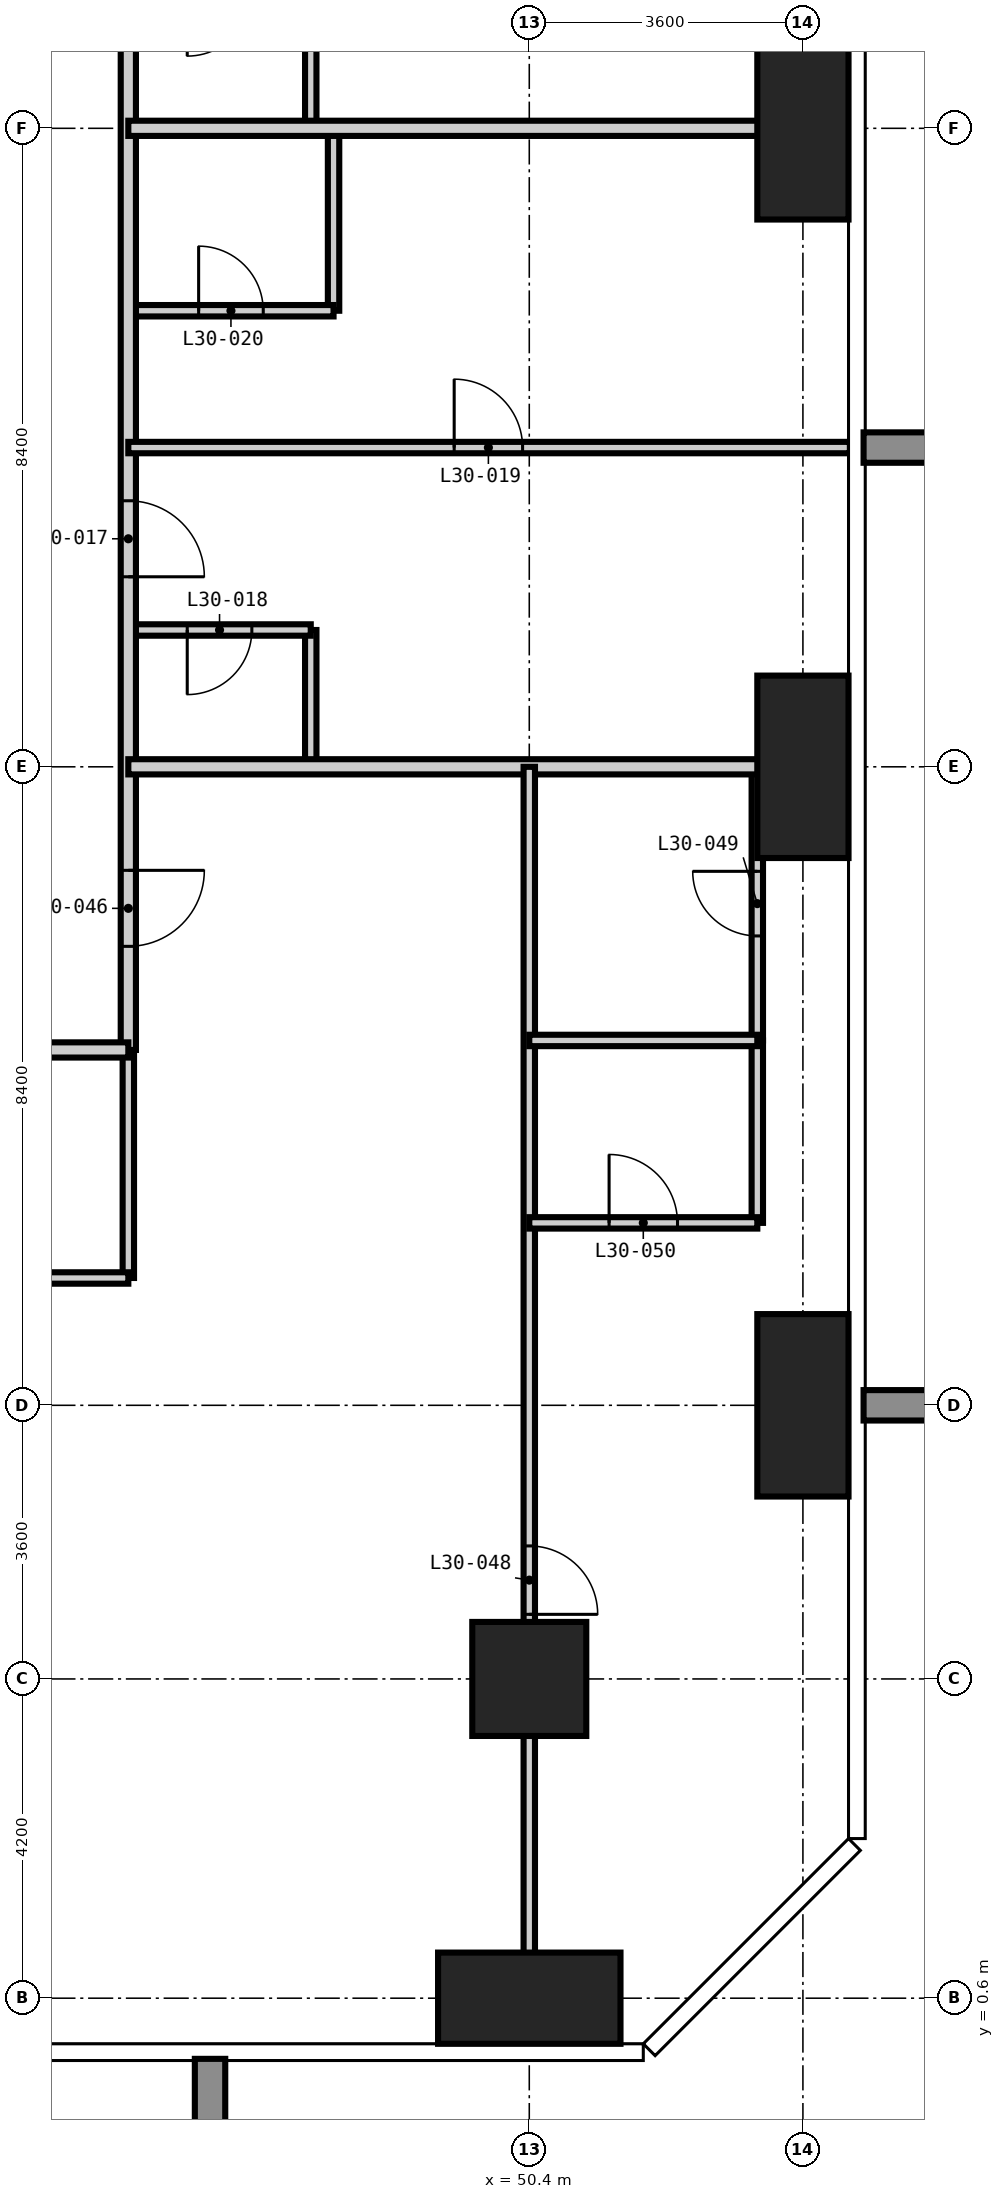
"""IFC4 building model, lengths in metres.
Left out: names, types, materials, properties, quantities, classifications, styles, units other than length and angle.
Written with IfcOpenShell. Run it as: python <this file> out.ifc"""

import sys

from ifc_helpers import new_model, si_unit, direction, frame, frame_2d, origin, origin_2d, place, context, subcontext, project, spatial, rectangle, extrude, element, fill, save


model = new_model("IFC4")
c1 = context("Model", 3, precision=1e-05, world=origin(), true_north=direction((0.0, 1.0)))
c2 = subcontext(c1, "Body", "Model", "MODEL_VIEW")
j1 = project(units=[si_unit("LENGTHUNIT", "METRE"), si_unit("PLANEANGLEUNIT", "RADIAN")], contexts=[c1])
p1 = place(None, origin())
s1 = spatial("IfcSite", under=j1, at=p1, CompositionType="ELEMENT")
p2 = place(p1, origin())
s2 = spatial("IfcBuilding", under=s1, at=p2, CompositionType="ELEMENT")
p3 = place(p2, frame((0.0, 0.0, 118.8)))
s3 = spatial("IfcBuildingStorey", under=s2, at=p3, CompositionType="ELEMENT", Elevation=118.8)
p4 = place(p3, frame((50.4, 0.6, -0.35), z_axis=(0.0, 0.0, 1.0), x_axis=(1.0, 0.0, 0.0)))
e1 = element("IfcColumn", 1, at=p4, inside=s3, PredefinedType="COLUMN", context=c2, shape_type="SweptSolid", body=[
    extrude(rectangle(XDim=2.4, YDim=1.2, at=origin_2d()), origin(), (0.0, 0.0, 1.0), 3.6),
])
p5 = place(p3, frame((50.4, 4.8, -0.35), z_axis=(0.0, 0.0, 1.0), x_axis=(1.0, 0.0, 0.0)))
e2 = element("IfcColumn", 2, at=p5, inside=s3, PredefinedType="COLUMN", context=c2, shape_type="SweptSolid", body=[
    extrude(rectangle(XDim=1.5, YDim=1.5, at=origin_2d()), origin(), (0.0, 0.0, 1.0), 3.6),
])
for number, where, z_axis, x_axis in (
    (3, (54.0, 8.4, -0.35), (0.0, 0.0, 1.0), (1.0, 0.0, 0.0)),
    (4, (54.0, 16.8, -0.35), (0.0, 0.0, 1.0), (1.0, 0.0, 0.0)),
    (5, (54.0, 25.2, -0.35), (0.0, 0.0, 1.0), (1.0, 0.0, 0.0)),
):
    element("IfcColumn", number, at=place(p3, frame(where, z_axis=z_axis, x_axis=x_axis)), inside=s3, PredefinedType="COLUMN", context=c2, shape_type="SweptSolid", body=[
        extrude(rectangle(XDim=1.2, YDim=2.4, at=origin_2d()), origin(), (0.0, 0.0, 1.0), 3.6),
    ])
p6 = place(p3, frame((45.125, 10.075, 0.0), z_axis=(0.0, 0.0, 1.0), x_axis=(0.0, 1.0, 0.0)))
e6 = element("IfcWall", 6, at=p6, inside=s3, PredefinedType="PARTITIONING", context=c2, shape_type="SweptSolid", body=[
    extrude(rectangle(XDim=3.0, YDim=0.15, at=frame_2d((1.5, 0.0))), origin(), (0.0, 0.0, 1.0), 3.25),
])
for number, where, z_axis, x_axis in (
    (7, (47.525, 16.8, 0.0), (0.0, 0.0, 1.0), (0.0, 1.0, 0.0)),
    (8, (47.525, 25.2, 0.0), (0.0, 0.0, 1.0), (0.0, 1.0, 0.0)),
):
    element("IfcWall", number, at=place(p3, frame(where, z_axis=z_axis, x_axis=x_axis)), inside=s3, PredefinedType="PARTITIONING", context=c2, shape_type="SweptSolid", body=[
        extrude(rectangle(XDim=1.8, YDim=0.15, at=frame_2d((0.9, 0.0))), origin(), (0.0, 0.0, 1.0), 3.25),
    ])
p7 = place(p3, frame((47.825, 22.8, 0.0), z_axis=(0.0, 0.0, 1.0), x_axis=(0.0, 1.0, 0.0)))
e9 = element("IfcWall", 9, at=p7, inside=s3, PredefinedType="PARTITIONING", context=c2, shape_type="SweptSolid", body=[
    extrude(rectangle(XDim=2.4, YDim=0.15, at=frame_2d((1.2, 0.0))), origin(), (0.0, 0.0, 1.0), 3.25),
])
p8 = place(p3, frame((53.4, 13.2, 0.0), z_axis=(0.0, 0.0, 1.0), x_axis=(0.0, 1.0, 0.0)))
e10 = element("IfcWall", 10, at=p8, inside=s3, PredefinedType="PARTITIONING", context=c2, shape_type="SweptSolid", body=[
    extrude(rectangle(XDim=3.6, YDim=0.15, at=frame_2d((1.8, 0.0))), origin(), (0.0, 0.0, 1.0), 3.25),
])
p9 = place(p8, frame((1.375, 0.0, 0.0)))
e11 = element("IfcOpeningElement", 11, at=p9, cuts=e10, PredefinedType="OPENING", context=c2, shape_type="SweptSolid", body=[
    extrude(rectangle(XDim=0.85, YDim=2.1, at=frame_2d((0.425, 1.05))), frame((0.0, 0.085, 0.0), z_axis=(0.0, -1.0, 0.0), x_axis=(1.0, 0.0, 0.0)), (0.0, 0.0, 1.0), 0.17),
])
p10 = place(p3, frame((42.0, 10.075, 0.0), z_axis=(0.0, 0.0, 1.0), x_axis=(1.0, 0.0, 0.0)))
e12 = element("IfcWall", 12, at=p10, inside=s3, PredefinedType="PARTITIONING", context=c2, shape_type="SweptSolid", body=[
    extrude(rectangle(XDim=3.125, YDim=0.15, at=frame_2d((1.562, 0.0))), origin(), (0.0, 0.0, 1.0), 3.25),
])
p11 = place(p10, frame((1.138, 0.0, 0.0)))
e13 = element("IfcOpeningElement", 13, at=p11, cuts=e12, PredefinedType="OPENING", context=c2, shape_type="SweptSolid", body=[
    extrude(rectangle(XDim=0.85, YDim=2.1, at=frame_2d((0.425, 1.05))), frame((0.0, 0.085, 0.0), z_axis=(0.0, -1.0, 0.0), x_axis=(1.0, 0.0, 0.0)), (0.0, 0.0, 1.0), 0.17),
])
p12 = place(p3, frame((45.125, 18.6, 0.0), z_axis=(0.0, 0.0, 1.0), x_axis=(1.0, 0.0, 0.0)))
e14 = element("IfcWall", 14, at=p12, inside=s3, PredefinedType="PARTITIONING", context=c2, shape_type="SweptSolid", body=[
    extrude(rectangle(XDim=2.4, YDim=0.15, at=frame_2d((1.2, 0.0))), origin(), (0.0, 0.0, 1.0), 3.25),
])
p13 = place(p12, frame((0.775, 0.0, 0.0)))
e15 = element("IfcOpeningElement", 15, at=p13, cuts=e14, PredefinedType="OPENING", context=c2, shape_type="SweptSolid", body=[
    extrude(rectangle(XDim=0.85, YDim=2.1, at=frame_2d((0.425, 1.05))), frame((0.0, 0.085, 0.0), z_axis=(0.0, -1.0, 0.0), x_axis=(1.0, 0.0, 0.0)), (0.0, 0.0, 1.0), 0.17),
])
p14 = place(p3, frame((45.125, 22.8, 0.0), z_axis=(0.0, 0.0, 1.0), x_axis=(1.0, 0.0, 0.0)))
e16 = element("IfcWall", 16, at=p14, inside=s3, PredefinedType="PARTITIONING", context=c2, shape_type="SweptSolid", body=[
    extrude(rectangle(XDim=2.7, YDim=0.15, at=frame_2d((1.35, 0.0))), origin(), (0.0, 0.0, 1.0), 3.25),
])
p15 = place(p14, frame((0.925, 0.0, 0.0)))
e17 = element("IfcOpeningElement", 17, at=p15, cuts=e16, PredefinedType="OPENING", context=c2, shape_type="SweptSolid", body=[
    extrude(rectangle(XDim=0.85, YDim=2.1, at=frame_2d((0.425, 1.05))), frame((0.0, 0.085, 0.0), z_axis=(0.0, -1.0, 0.0), x_axis=(1.0, 0.0, 0.0)), (0.0, 0.0, 1.0), 0.17),
])
p16 = place(p3, frame((45.125, 44.525, 0.0), z_axis=(0.0, 0.0, 1.0), x_axis=(0.0, -1.0, 0.0)))
e18 = element("IfcWall", 18, at=p16, inside=s3, PredefinedType="PARTITIONING", context=c2, shape_type="SweptSolid", body=[
    extrude(rectangle(XDim=31.45, YDim=0.2, at=frame_2d((15.725, 0.0))), origin(), (0.0, 0.0, 1.0), 3.25),
])
p17 = place(p16, frame((24.225, 0.0, 0.0)))
e19 = element("IfcOpeningElement", 19, at=p17, cuts=e18, PredefinedType="OPENING", context=c2, shape_type="SweptSolid", body=[
    extrude(rectangle(XDim=1.0, YDim=2.2, at=frame_2d((0.5, 1.1))), frame((0.0, 0.11, 0.0), z_axis=(0.0, -1.0, 0.0), x_axis=(1.0, 0.0, 0.0)), (0.0, 0.0, 1.0), 0.22),
])
p18 = place(p16, frame((15.825, 0.0, 0.0)))
e20 = element("IfcOpeningElement", 20, at=p18, cuts=e18, PredefinedType="OPENING", context=c2, shape_type="SweptSolid", body=[
    extrude(rectangle(XDim=1.0, YDim=2.2, at=frame_2d((0.5, 1.1))), frame((0.0, 0.11, 0.0), z_axis=(0.0, -1.0, 0.0), x_axis=(1.0, 0.0, 0.0)), (0.0, 0.0, 1.0), 0.22),
])
p19 = place(p16, frame((7.425, 0.0, 0.0)))
e21 = element("IfcOpeningElement", 21, at=p19, cuts=e18, PredefinedType="OPENING", context=c2, shape_type="SweptSolid", body=[
    extrude(rectangle(XDim=1.0, YDim=2.2, at=frame_2d((0.5, 1.1))), frame((0.0, 0.11, 0.0), z_axis=(0.0, -1.0, 0.0), x_axis=(1.0, 0.0, 0.0)), (0.0, 0.0, 1.0), 0.22),
])
p20 = place(p16, frame((29.087, 0.0, 0.0)))
e22 = element("IfcOpeningElement", 22, at=p20, cuts=e18, PredefinedType="OPENING", context=c2, shape_type="SweptSolid", body=[
    extrude(rectangle(XDim=1.0, YDim=2.2, at=frame_2d((0.5, 1.1))), frame((0.0, 0.11, 0.0), z_axis=(0.0, -1.0, 0.0), x_axis=(1.0, 0.0, 0.0)), (0.0, 0.0, 1.0), 0.22),
])
p21 = place(p16, frame((0.762, 0.0, 0.0)))
e23 = element("IfcOpeningElement", 23, at=p21, cuts=e18, PredefinedType="OPENING", context=c2, shape_type="SweptSolid", body=[
    extrude(rectangle(XDim=1.0, YDim=2.2, at=frame_2d((0.5, 1.1))), frame((0.0, 0.11, 0.0), z_axis=(0.0, -1.0, 0.0), x_axis=(1.0, 0.0, 0.0)), (0.0, 0.0, 1.0), 0.22),
])
p22 = place(p3, frame((45.125, 13.075, 0.0), z_axis=(0.0, 0.0, 1.0), x_axis=(-1.0, 0.0, 0.0)))
e24 = element("IfcWall", 24, at=p22, inside=s3, PredefinedType="PARTITIONING", context=c2, shape_type="SweptSolid", body=[
    extrude(rectangle(XDim=32.525, YDim=0.2, at=frame_2d((16.262, 0.0))), origin(), (0.0, 0.0, 1.0), 3.25),
])
p23 = place(p22, frame((22.425, 0.0, 0.0)))
e25 = element("IfcOpeningElement", 25, at=p23, cuts=e24, PredefinedType="OPENING", context=c2, shape_type="SweptSolid", body=[
    extrude(rectangle(XDim=1.0, YDim=2.2, at=frame_2d((0.5, 1.1))), frame((0.0, 0.11, 0.0), z_axis=(0.0, -1.0, 0.0), x_axis=(1.0, 0.0, 0.0)), (0.0, 0.0, 1.0), 0.22),
])
p24 = place(p22, frame((14.025, 0.0, 0.0)))
e26 = element("IfcOpeningElement", 26, at=p24, cuts=e24, PredefinedType="OPENING", context=c2, shape_type="SweptSolid", body=[
    extrude(rectangle(XDim=1.0, YDim=2.2, at=frame_2d((0.5, 1.1))), frame((0.0, 0.11, 0.0), z_axis=(0.0, -1.0, 0.0), x_axis=(1.0, 0.0, 0.0)), (0.0, 0.0, 1.0), 0.22),
])
p25 = place(p22, frame((5.625, 0.0, 0.0)))
e27 = element("IfcOpeningElement", 27, at=p25, cuts=e24, PredefinedType="OPENING", context=c2, shape_type="SweptSolid", body=[
    extrude(rectangle(XDim=1.0, YDim=2.2, at=frame_2d((0.5, 1.1))), frame((0.0, 0.11, 0.0), z_axis=(0.0, -1.0, 0.0), x_axis=(1.0, 0.0, 0.0)), (0.0, 0.0, 1.0), 0.22),
])
for number, where, z_axis, x_axis in (
    (28, (45.125, 16.8, 0.0), (0.0, 0.0, 1.0), (1.0, 0.0, 0.0)),
    (29, (45.125, 25.2, 0.0), (0.0, 0.0, 1.0), (1.0, 0.0, 0.0)),
):
    element("IfcWall", number, at=place(p3, frame(where, z_axis=z_axis, x_axis=x_axis)), inside=s3, PredefinedType="PARTITIONING", context=c2, shape_type="SweptSolid", body=[
        extrude(rectangle(XDim=9.493, YDim=0.2, at=frame_2d((4.747, 0.0))), origin(), (0.0, 0.0, 1.0), 3.25),
    ])
p26 = place(p3, frame((50.4, -0.018, 0.0), z_axis=(0.0, 0.0, 1.0), x_axis=(0.0, 1.0, 0.0)))
e30 = element("IfcWall", 30, at=p26, inside=s3, PredefinedType="PARTITIONING", context=c2, shape_type="SweptSolid", body=[
    extrude(rectangle(XDim=16.818, YDim=0.15, at=frame_2d((8.409, 0.0))), origin(), (0.0, 0.0, 1.0), 3.25),
])
p27 = place(p26, frame((5.668, 0.0, 0.0)))
e31 = element("IfcOpeningElement", 31, at=p27, cuts=e30, PredefinedType="OPENING", context=c2, shape_type="SweptSolid", body=[
    extrude(rectangle(XDim=0.9, YDim=2.1, at=frame_2d((0.45, 1.05))), frame((0.0, 0.085, 0.0), z_axis=(0.0, -1.0, 0.0), x_axis=(1.0, 0.0, 0.0)), (0.0, 0.0, 1.0), 0.17),
])
p28 = place(p3, frame((53.4, 10.8, 0.0), z_axis=(0.0, 0.0, 1.0), x_axis=(0.0, 1.0, 0.0)))
e32 = element("IfcWall", 32, at=p28, inside=s3, PredefinedType="PARTITIONING", context=c2, shape_type="SweptSolid", body=[
    extrude(rectangle(XDim=2.4, YDim=0.15, at=frame_2d((1.2, 0.0))), origin(), (0.0, 0.0, 1.0), 3.25),
])
p29 = place(p3, frame((50.4, 10.8, 0.0), z_axis=(0.0, 0.0, 1.0), x_axis=(1.0, 0.0, 0.0)))
e33 = element("IfcWall", 33, at=p29, inside=s3, PredefinedType="PARTITIONING", context=c2, shape_type="SweptSolid", body=[
    extrude(rectangle(XDim=3.0, YDim=0.15, at=frame_2d((1.5, 0.0))), origin(), (0.0, 0.0, 1.0), 3.25),
])
p30 = place(p29, frame((1.05, 0.0, 0.0)))
e34 = element("IfcOpeningElement", 34, at=p30, cuts=e33, PredefinedType="OPENING", context=c2, shape_type="SweptSolid", body=[
    extrude(rectangle(XDim=0.9, YDim=2.1, at=frame_2d((0.45, 1.05))), frame((0.0, 0.085, 0.0), z_axis=(0.0, -1.0, 0.0), x_axis=(1.0, 0.0, 0.0)), (0.0, 0.0, 1.0), 0.17),
])
p31 = place(p3, frame((50.4, 13.2, 0.0), z_axis=(0.0, 0.0, 1.0), x_axis=(1.0, 0.0, 0.0)))
e35 = element("IfcWall", 35, at=p31, inside=s3, PredefinedType="PARTITIONING", context=c2, shape_type="SweptSolid", body=[
    extrude(rectangle(XDim=3.0, YDim=0.15, at=frame_2d((1.5, 0.0))), origin(), (0.0, 0.0, 1.0), 3.25),
])
p32 = place(p3, frame((45.125, 21.0, 0.0), z_axis=(0.0, 0.0, 1.0), x_axis=(1.0, 0.0, 0.0)))
e36 = element("IfcWall", 36, at=p32, inside=s3, PredefinedType="PARTITIONING", context=c2, shape_type="SweptSolid", body=[
    extrude(rectangle(XDim=9.493, YDim=0.15, at=frame_2d((4.747, 0.0))), origin(), (0.0, 0.0, 1.0), 3.25),
])
p33 = place(p32, frame((4.287, 0.0, 0.0)))
e37 = element("IfcOpeningElement", 37, at=p33, cuts=e36, PredefinedType="OPENING", context=c2, shape_type="SweptSolid", body=[
    extrude(rectangle(XDim=0.9, YDim=2.1, at=frame_2d((0.45, 1.05))), frame((0.0, 0.085, 0.0), z_axis=(0.0, -1.0, 0.0), x_axis=(1.0, 0.0, 0.0)), (0.0, 0.0, 1.0), 0.17),
])
p34 = place(p17, origin())
e38 = element("IfcDoor", 38, at=p34, inside=s3, OperationType="SINGLE_SWING_RIGHT", PredefinedType="DOOR", context=c2, shape_type="SweptSolid", body=[
    extrude(rectangle(XDim=1.0, YDim=2.2, at=frame_2d((0.5, 1.1))), frame((0.0, 0.025, 0.0), z_axis=(0.0, -1.0, 0.0), x_axis=(1.0, 0.0, 0.0)), (0.0, 0.0, 1.0), 0.05),
])
fill(e19, e38)
p35 = place(p13, frame((0.85, 0.0, 0.0), z_axis=(0.0, 0.0, 1.0), x_axis=(-1.0, 0.0, 0.0)))
e39 = element("IfcDoor", 39, at=p35, inside=s3, OperationType="SINGLE_SWING_RIGHT", PredefinedType="DOOR", context=c2, shape_type="SweptSolid", body=[
    extrude(rectangle(XDim=0.85, YDim=2.1, at=frame_2d((0.425, 1.05))), frame((0.0, 0.025, 0.0), z_axis=(0.0, -1.0, 0.0), x_axis=(1.0, 0.0, 0.0)), (0.0, 0.0, 1.0), 0.05),
])
fill(e15, e39)
p36 = place(p33, origin())
e40 = element("IfcDoor", 40, at=p36, inside=s3, OperationType="SINGLE_SWING_LEFT", PredefinedType="DOOR", context=c2, shape_type="SweptSolid", body=[
    extrude(rectangle(XDim=0.9, YDim=2.1, at=frame_2d((0.45, 1.05))), frame((0.0, 0.025, 0.0), z_axis=(0.0, -1.0, 0.0), x_axis=(1.0, 0.0, 0.0)), (0.0, 0.0, 1.0), 0.05),
])
fill(e37, e40)
p37 = place(p15, origin())
e41 = element("IfcDoor", 41, at=p37, inside=s3, OperationType="SINGLE_SWING_LEFT", PredefinedType="DOOR", context=c2, shape_type="SweptSolid", body=[
    extrude(rectangle(XDim=0.85, YDim=2.1, at=frame_2d((0.425, 1.05))), frame((0.0, 0.025, 0.0), z_axis=(0.0, -1.0, 0.0), x_axis=(1.0, 0.0, 0.0)), (0.0, 0.0, 1.0), 0.05),
])
fill(e17, e41)
p38 = place(p20, origin())
e42 = element("IfcDoor", 42, at=p38, inside=s3, OperationType="SINGLE_SWING_LEFT", PredefinedType="DOOR", context=c2, shape_type="SweptSolid", body=[
    extrude(rectangle(XDim=1.0, YDim=2.2, at=frame_2d((0.5, 1.1))), frame((0.0, 0.025, 0.0), z_axis=(0.0, -1.0, 0.0), x_axis=(1.0, 0.0, 0.0)), (0.0, 0.0, 1.0), 0.05),
])
fill(e22, e42)
p39 = place(p27, frame((0.9, 0.0, 0.0), z_axis=(0.0, 0.0, 1.0), x_axis=(-1.0, 0.0, 0.0)))
e43 = element("IfcDoor", 43, at=p39, inside=s3, OperationType="SINGLE_SWING_RIGHT", PredefinedType="DOOR", context=c2, shape_type="SweptSolid", body=[
    extrude(rectangle(XDim=0.9, YDim=2.1, at=frame_2d((0.45, 1.05))), frame((0.0, 0.025, 0.0), z_axis=(0.0, -1.0, 0.0), x_axis=(1.0, 0.0, 0.0)), (0.0, 0.0, 1.0), 0.05),
])
fill(e31, e43)
p40 = place(p9, origin())
e44 = element("IfcDoor", 44, at=p40, inside=s3, OperationType="SINGLE_SWING_RIGHT", PredefinedType="DOOR", context=c2, shape_type="SweptSolid", body=[
    extrude(rectangle(XDim=0.85, YDim=2.1, at=frame_2d((0.425, 1.05))), frame((0.0, 0.025, 0.0), z_axis=(0.0, -1.0, 0.0), x_axis=(1.0, 0.0, 0.0)), (0.0, 0.0, 1.0), 0.05),
])
fill(e11, e44)
p41 = place(p30, origin())
e45 = element("IfcDoor", 45, at=p41, inside=s3, OperationType="SINGLE_SWING_LEFT", PredefinedType="DOOR", context=c2, shape_type="SweptSolid", body=[
    extrude(rectangle(XDim=0.9, YDim=2.1, at=frame_2d((0.45, 1.05))), frame((0.0, 0.025, 0.0), z_axis=(0.0, -1.0, 0.0), x_axis=(1.0, 0.0, 0.0)), (0.0, 0.0, 1.0), 0.05),
])
fill(e34, e45)
save(model, sys.argv[1])
